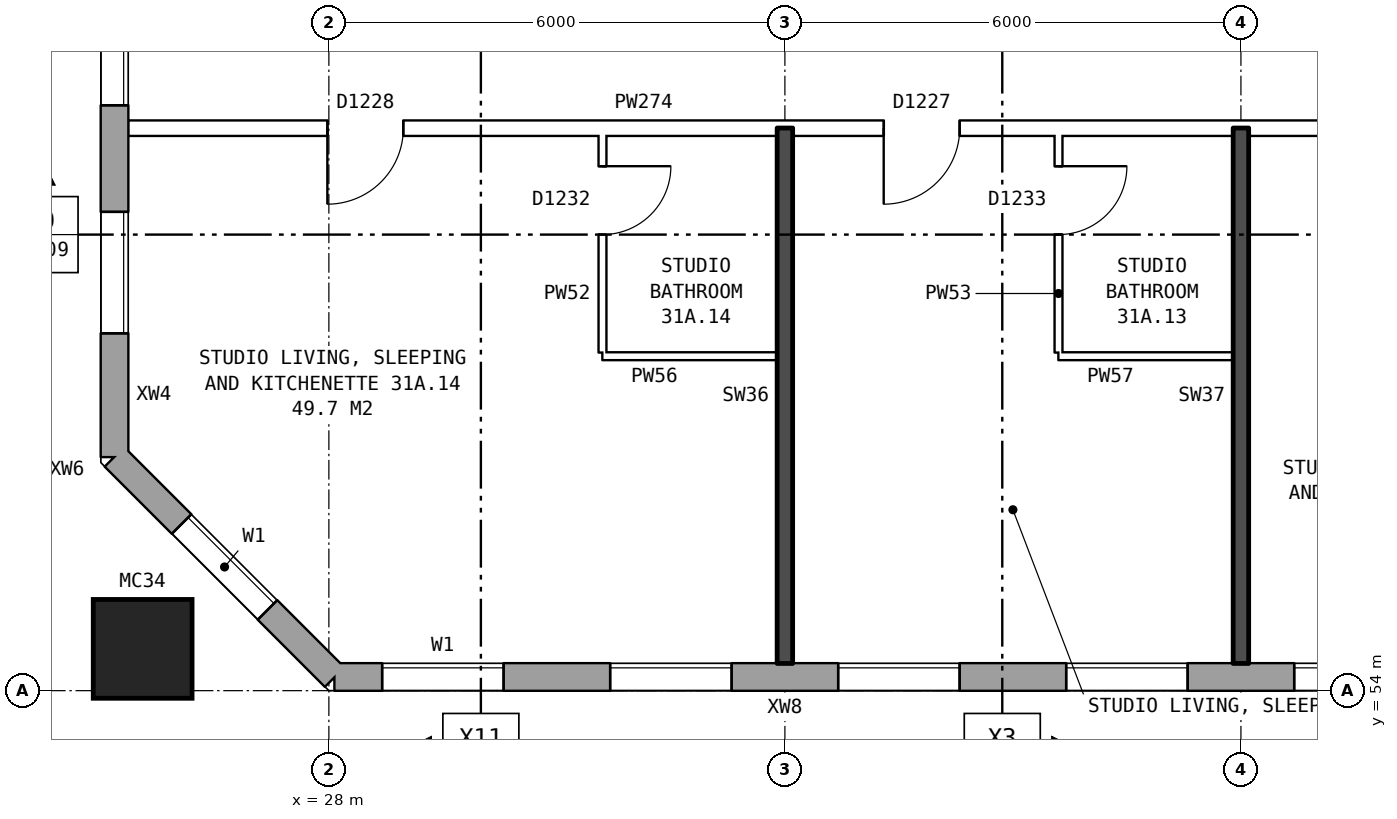
"""IFC4 building model, lengths in metres.
Left out: names, types, materials, properties, quantities, classifications, styles, units other than length and angle.
Written with IfcOpenShell. Run it as: python <this file> out.ifc"""

import sys

from ifc_helpers import new_model, si_unit, direction, frame, frame_2d, origin, origin_2d, place, context, subcontext, project, spatial, rectangle, hollow_rectangle, extrude, element, fill, save


model = new_model("IFC4")
c1 = context("Model", 3, precision=1e-05, world=origin(), true_north=direction((0.0, 1.0)))
c2 = subcontext(c1, "Body", "Model", "MODEL_VIEW")
j1 = project(units=[si_unit("LENGTHUNIT", "METRE"), si_unit("PLANEANGLEUNIT", "RADIAN")], contexts=[c1])
p1 = place(None, origin())
s1 = spatial("IfcSite", under=j1, at=p1, CompositionType="ELEMENT")
p2 = place(p1, origin())
s2 = spatial("IfcBuilding", under=s1, at=p2, CompositionType="ELEMENT")
p3 = place(p2, frame((0.0, 0.0, 111.9)))
s3 = spatial("IfcBuildingStorey", under=s2, at=p3, CompositionType="ELEMENT", Elevation=111.9)
p4 = place(p3, frame((25.55, 54.55, 0.0), z_axis=(0.0, 0.0, 1.0), x_axis=(1.0, 0.0, 0.0)))
e1 = element("IfcColumn", 1, at=p4, inside=s3, PredefinedType="COLUMN", context=c2, shape_type="SweptSolid", body=[
    extrude(hollow_rectangle(XDim=1.3, YDim=1.3, WallThickness=0.07, at=origin_2d()), origin(), (0.0, 0.0, 1.0), 3.1),
])
p5 = place(p3, frame((25.18, 57.075, 0.0), z_axis=(0.0, 0.0, 1.0), x_axis=(0.707106781187, -0.707106781187, 0.0)))
e2 = element("IfcWall", 2, at=p5, inside=s3, PredefinedType="STANDARD", context=c2, shape_type="SweptSolid", body=[
    extrude(rectangle(XDim=4.094, YDim=0.36, at=frame_2d((2.047, 0.0))), origin(), (0.0, 0.0, 1.0), 2.85),
])
p6 = place(p5, frame((1.247, 0.0, 0.8)))
e3 = element("IfcOpeningElement", 3, at=p6, cuts=e2, PredefinedType="OPENING", context=c2, shape_type="SweptSolid", body=[
    extrude(rectangle(XDim=1.6, YDim=1.8, at=frame_2d((0.8, 0.9))), frame((0.0, 0.19, 0.0), z_axis=(0.0, -1.0, 0.0), x_axis=(1.0, 0.0, 0.0)), (0.0, 0.0, 1.0), 0.38),
])
p7 = place(p3, frame((28.075, 54.18, 0.0), z_axis=(0.0, 0.0, 1.0), x_axis=(1.0, 0.0, 0.0)))
e4 = element("IfcWall", 4, at=p7, inside=s3, PredefinedType="STANDARD", context=c2, shape_type="SweptSolid", body=[
    extrude(rectangle(XDim=44.851, YDim=0.36, at=frame_2d((22.425, 0.0))), origin(), (0.0, 0.0, 1.0), 2.85),
])
p8 = place(p7, frame((0.625, 0.0, 0.8)))
e5 = element("IfcOpeningElement", 5, at=p8, cuts=e4, PredefinedType="OPENING", context=c2, shape_type="SweptSolid", body=[
    extrude(rectangle(XDim=1.6, YDim=1.8, at=frame_2d((0.8, 0.9))), frame((0.0, 0.19, 0.0), z_axis=(0.0, -1.0, 0.0), x_axis=(1.0, 0.0, 0.0)), (0.0, 0.0, 1.0), 0.38),
])
p9 = place(p7, frame((3.625, 0.0, 0.8)))
e6 = element("IfcOpeningElement", 6, at=p9, cuts=e4, PredefinedType="OPENING", context=c2, shape_type="SweptSolid", body=[
    extrude(rectangle(XDim=1.6, YDim=1.8, at=frame_2d((0.8, 0.9))), frame((0.0, 0.19, 0.0), z_axis=(0.0, -1.0, 0.0), x_axis=(1.0, 0.0, 0.0)), (0.0, 0.0, 1.0), 0.38),
])
p10 = place(p7, frame((6.625, 0.0, 0.8)))
e7 = element("IfcOpeningElement", 7, at=p10, cuts=e4, PredefinedType="OPENING", context=c2, shape_type="SweptSolid", body=[
    extrude(rectangle(XDim=1.6, YDim=1.8, at=frame_2d((0.8, 0.9))), frame((0.0, 0.19, 0.0), z_axis=(0.0, -1.0, 0.0), x_axis=(1.0, 0.0, 0.0)), (0.0, 0.0, 1.0), 0.38),
])
p11 = place(p7, frame((9.625, 0.0, 0.8)))
e8 = element("IfcOpeningElement", 8, at=p11, cuts=e4, PredefinedType="OPENING", context=c2, shape_type="SweptSolid", body=[
    extrude(rectangle(XDim=1.6, YDim=1.8, at=frame_2d((0.8, 0.9))), frame((0.0, 0.19, 0.0), z_axis=(0.0, -1.0, 0.0), x_axis=(1.0, 0.0, 0.0)), (0.0, 0.0, 1.0), 0.38),
])
p12 = place(p7, frame((12.625, 0.0, 0.8)))
e9 = element("IfcOpeningElement", 9, at=p12, cuts=e4, PredefinedType="OPENING", context=c2, shape_type="SweptSolid", body=[
    extrude(rectangle(XDim=1.6, YDim=1.8, at=frame_2d((0.8, 0.9))), frame((0.0, 0.19, 0.0), z_axis=(0.0, -1.0, 0.0), x_axis=(1.0, 0.0, 0.0)), (0.0, 0.0, 1.0), 0.38),
])
p13 = place(p7, frame((15.625, 0.0, 0.8)))
e10 = element("IfcOpeningElement", 10, at=p13, cuts=e4, PredefinedType="OPENING", context=c2, shape_type="SweptSolid", body=[
    extrude(rectangle(XDim=1.6, YDim=1.8, at=frame_2d((0.8, 0.9))), frame((0.0, 0.19, 0.0), z_axis=(0.0, -1.0, 0.0), x_axis=(1.0, 0.0, 0.0)), (0.0, 0.0, 1.0), 0.38),
])
p14 = place(p7, frame((18.125, 0.0, 0.8)))
e11 = element("IfcOpeningElement", 11, at=p14, cuts=e4, PredefinedType="OPENING", context=c2, shape_type="SweptSolid", body=[
    extrude(rectangle(XDim=1.0, YDim=1.8, at=frame_2d((0.5, 0.9))), frame((0.0, 0.19, 0.0), z_axis=(0.0, -1.0, 0.0), x_axis=(1.0, 0.0, 0.0)), (0.0, 0.0, 1.0), 0.38),
])
p15 = place(p7, frame((21.175, 0.0, 0.15)))
e12 = element("IfcOpeningElement", 12, at=p15, cuts=e4, PredefinedType="OPENING", context=c2, shape_type="SweptSolid", body=[
    extrude(rectangle(XDim=0.6, YDim=1.2, at=frame_2d((0.3, 0.6))), frame((0.0, 0.19, 0.0), z_axis=(0.0, -1.0, 0.0), x_axis=(1.0, 0.0, 0.0)), (0.0, 0.0, 1.0), 0.38),
])
p16 = place(p7, frame((24.425, 0.0, 1.7)))
e13 = element("IfcOpeningElement", 13, at=p16, cuts=e4, PredefinedType="OPENING", context=c2, shape_type="SweptSolid", body=[
    extrude(rectangle(XDim=1.0, YDim=0.9, at=frame_2d((0.5, 0.45))), frame((0.0, 0.19, 0.0), z_axis=(0.0, -1.0, 0.0), x_axis=(1.0, 0.0, 0.0)), (0.0, 0.0, 1.0), 0.38),
])
p17 = place(p7, frame((27.625, 0.0, 0.8)))
e14 = element("IfcOpeningElement", 14, at=p17, cuts=e4, PredefinedType="OPENING", context=c2, shape_type="SweptSolid", body=[
    extrude(rectangle(XDim=1.6, YDim=1.8, at=frame_2d((0.8, 0.9))), frame((0.0, 0.19, 0.0), z_axis=(0.0, -1.0, 0.0), x_axis=(1.0, 0.0, 0.0)), (0.0, 0.0, 1.0), 0.38),
])
p18 = place(p7, frame((30.625, 0.0, 0.8)))
e15 = element("IfcOpeningElement", 15, at=p18, cuts=e4, PredefinedType="OPENING", context=c2, shape_type="SweptSolid", body=[
    extrude(rectangle(XDim=1.6, YDim=1.8, at=frame_2d((0.8, 0.9))), frame((0.0, 0.19, 0.0), z_axis=(0.0, -1.0, 0.0), x_axis=(1.0, 0.0, 0.0)), (0.0, 0.0, 1.0), 0.38),
])
p19 = place(p7, frame((33.625, 0.0, 0.8)))
e16 = element("IfcOpeningElement", 16, at=p19, cuts=e4, PredefinedType="OPENING", context=c2, shape_type="SweptSolid", body=[
    extrude(rectangle(XDim=1.6, YDim=1.8, at=frame_2d((0.8, 0.9))), frame((0.0, 0.19, 0.0), z_axis=(0.0, -1.0, 0.0), x_axis=(1.0, 0.0, 0.0)), (0.0, 0.0, 1.0), 0.38),
])
p20 = place(p7, frame((36.625, 0.0, 0.8)))
e17 = element("IfcOpeningElement", 17, at=p20, cuts=e4, PredefinedType="OPENING", context=c2, shape_type="SweptSolid", body=[
    extrude(rectangle(XDim=1.6, YDim=1.8, at=frame_2d((0.8, 0.9))), frame((0.0, 0.19, 0.0), z_axis=(0.0, -1.0, 0.0), x_axis=(1.0, 0.0, 0.0)), (0.0, 0.0, 1.0), 0.38),
])
p21 = place(p7, frame((39.625, 0.0, 0.8)))
e18 = element("IfcOpeningElement", 18, at=p21, cuts=e4, PredefinedType="OPENING", context=c2, shape_type="SweptSolid", body=[
    extrude(rectangle(XDim=1.6, YDim=1.8, at=frame_2d((0.8, 0.9))), frame((0.0, 0.19, 0.0), z_axis=(0.0, -1.0, 0.0), x_axis=(1.0, 0.0, 0.0)), (0.0, 0.0, 1.0), 0.38),
])
p22 = place(p7, frame((42.625, 0.0, 0.8)))
e19 = element("IfcOpeningElement", 19, at=p22, cuts=e4, PredefinedType="OPENING", context=c2, shape_type="SweptSolid", body=[
    extrude(rectangle(XDim=1.6, YDim=1.8, at=frame_2d((0.8, 0.9))), frame((0.0, 0.19, 0.0), z_axis=(0.0, -1.0, 0.0), x_axis=(1.0, 0.0, 0.0)), (0.0, 0.0, 1.0), 0.38),
])
p23 = place(p7, frame((19.425, 0.0, 1.7)))
e20 = element("IfcOpeningElement", 20, at=p23, cuts=e4, PredefinedType="OPENING", context=c2, shape_type="SweptSolid", body=[
    extrude(rectangle(XDim=1.0, YDim=0.9, at=frame_2d((0.5, 0.45))), frame((0.0, 0.19, 0.0), z_axis=(0.0, -1.0, 0.0), x_axis=(1.0, 0.0, 0.0)), (0.0, 0.0, 1.0), 0.38),
])
p24 = place(p7, frame((22.075, 0.0, 0.15)))
e21 = element("IfcOpeningElement", 21, at=p24, cuts=e4, PredefinedType="OPENING", context=c2, shape_type="SweptSolid", body=[
    extrude(rectangle(XDim=1.6, YDim=1.2, at=frame_2d((0.8, 0.6))), frame((0.0, 0.19, 0.0), z_axis=(0.0, -1.0, 0.0), x_axis=(1.0, 0.0, 0.0)), (0.0, 0.0, 1.0), 0.38),
])
p25 = place(p7, frame((25.725, 0.0, 0.8)))
e22 = element("IfcOpeningElement", 22, at=p25, cuts=e4, PredefinedType="OPENING", context=c2, shape_type="SweptSolid", body=[
    extrude(rectangle(XDim=1.0, YDim=1.8, at=frame_2d((0.5, 0.9))), frame((0.0, 0.19, 0.0), z_axis=(0.0, -1.0, 0.0), x_axis=(1.0, 0.0, 0.0)), (0.0, 0.0, 1.0), 0.38),
])
p26 = place(p3, frame((25.18, 82.925, 0.0), z_axis=(0.0, 0.0, 1.0), x_axis=(0.0, -1.0, 0.0)))
e23 = element("IfcWall", 23, at=p26, inside=s3, PredefinedType="STANDARD", context=c2, shape_type="SweptSolid", body=[
    extrude(rectangle(XDim=25.851, YDim=0.36, at=frame_2d((12.925, 0.0))), origin(), (0.0, 0.0, 1.0), 2.85),
])
p27 = place(p26, frame((1.625, 0.0, 0.8)))
e24 = element("IfcOpeningElement", 24, at=p27, cuts=e23, PredefinedType="OPENING", context=c2, shape_type="SweptSolid", body=[
    extrude(rectangle(XDim=1.6, YDim=1.8, at=frame_2d((0.8, 0.9))), frame((0.0, 0.19, 0.0), z_axis=(0.0, -1.0, 0.0), x_axis=(1.0, 0.0, 0.0)), (0.0, 0.0, 1.0), 0.38),
])
p28 = place(p26, frame((4.625, 0.0, 0.8)))
e25 = element("IfcOpeningElement", 25, at=p28, cuts=e23, PredefinedType="OPENING", context=c2, shape_type="SweptSolid", body=[
    extrude(rectangle(XDim=1.6, YDim=1.8, at=frame_2d((0.8, 0.9))), frame((0.0, 0.19, 0.0), z_axis=(0.0, -1.0, 0.0), x_axis=(1.0, 0.0, 0.0)), (0.0, 0.0, 1.0), 0.38),
])
p29 = place(p26, frame((7.625, 0.0, 0.8)))
e26 = element("IfcOpeningElement", 26, at=p29, cuts=e23, PredefinedType="OPENING", context=c2, shape_type="SweptSolid", body=[
    extrude(rectangle(XDim=1.6, YDim=1.8, at=frame_2d((0.8, 0.9))), frame((0.0, 0.19, 0.0), z_axis=(0.0, -1.0, 0.0), x_axis=(1.0, 0.0, 0.0)), (0.0, 0.0, 1.0), 0.38),
])
p30 = place(p26, frame((10.625, 0.0, 0.8)))
e27 = element("IfcOpeningElement", 27, at=p30, cuts=e23, PredefinedType="OPENING", context=c2, shape_type="SweptSolid", body=[
    extrude(rectangle(XDim=1.6, YDim=1.8, at=frame_2d((0.8, 0.9))), frame((0.0, 0.19, 0.0), z_axis=(0.0, -1.0, 0.0), x_axis=(1.0, 0.0, 0.0)), (0.0, 0.0, 1.0), 0.38),
])
p31 = place(p26, frame((13.625, 0.0, 0.8)))
e28 = element("IfcOpeningElement", 28, at=p31, cuts=e23, PredefinedType="OPENING", context=c2, shape_type="SweptSolid", body=[
    extrude(rectangle(XDim=1.6, YDim=1.8, at=frame_2d((0.8, 0.9))), frame((0.0, 0.19, 0.0), z_axis=(0.0, -1.0, 0.0), x_axis=(1.0, 0.0, 0.0)), (0.0, 0.0, 1.0), 0.38),
])
p32 = place(p26, frame((16.625, 0.0, 0.8)))
e29 = element("IfcOpeningElement", 29, at=p32, cuts=e23, PredefinedType="OPENING", context=c2, shape_type="SweptSolid", body=[
    extrude(rectangle(XDim=1.6, YDim=1.8, at=frame_2d((0.8, 0.9))), frame((0.0, 0.19, 0.0), z_axis=(0.0, -1.0, 0.0), x_axis=(1.0, 0.0, 0.0)), (0.0, 0.0, 1.0), 0.38),
])
p33 = place(p26, frame((19.625, 0.0, 0.8)))
e30 = element("IfcOpeningElement", 30, at=p33, cuts=e23, PredefinedType="OPENING", context=c2, shape_type="SweptSolid", body=[
    extrude(rectangle(XDim=1.6, YDim=1.8, at=frame_2d((0.8, 0.9))), frame((0.0, 0.19, 0.0), z_axis=(0.0, -1.0, 0.0), x_axis=(1.0, 0.0, 0.0)), (0.0, 0.0, 1.0), 0.38),
])
p34 = place(p26, frame((22.625, 0.0, 0.8)))
e31 = element("IfcOpeningElement", 31, at=p34, cuts=e23, PredefinedType="OPENING", context=c2, shape_type="SweptSolid", body=[
    extrude(rectangle(XDim=1.6, YDim=1.8, at=frame_2d((0.8, 0.9))), frame((0.0, 0.19, 0.0), z_axis=(0.0, -1.0, 0.0), x_axis=(1.0, 0.0, 0.0)), (0.0, 0.0, 1.0), 0.38),
])
for number, where, z_axis, x_axis in (
    (32, (31.6, 58.4, 0.0), (0.0, 0.0, 1.0), (1.0, 0.0, 0.0)),
    (33, (37.6, 58.4, 0.0), (0.0, 0.0, 1.0), (1.0, 0.0, 0.0)),
):
    element("IfcWall", number, at=place(p3, frame(where, z_axis=z_axis, x_axis=x_axis)), inside=s3, PredefinedType="PARTITIONING", context=c2, shape_type="SweptSolid", body=[
        extrude(rectangle(XDim=2.3, YDim=0.1, at=frame_2d((1.15, 0.0))), origin(), (0.0, 0.0, 1.0), 2.85),
    ])
p35 = place(p3, frame((25.36, 61.4, 0.0), z_axis=(0.0, 0.0, 1.0), x_axis=(1.0, 0.0, 0.0)))
e34 = element("IfcWall", 34, at=p35, inside=s3, PredefinedType="PARTITIONING", context=c2, shape_type="SweptSolid", body=[
    extrude(rectangle(XDim=20.54, YDim=0.2, at=frame_2d((10.27, 0.0))), origin(), (0.0, 0.0, 1.0), 2.85),
])
p36 = place(p35, frame((15.94, 0.0, 0.0)))
e35 = element("IfcOpeningElement", 35, at=p36, cuts=e34, PredefinedType="OPENING", context=c2, shape_type="SweptSolid", body=[
    extrude(rectangle(XDim=1.0, YDim=2.1, at=frame_2d((0.5, 1.05))), frame((0.0, 0.11, 0.0), z_axis=(0.0, -1.0, 0.0), x_axis=(1.0, 0.0, 0.0)), (0.0, 0.0, 1.0), 0.22),
])
p37 = place(p35, frame((9.94, 0.0, 0.0)))
e36 = element("IfcOpeningElement", 36, at=p37, cuts=e34, PredefinedType="OPENING", context=c2, shape_type="SweptSolid", body=[
    extrude(rectangle(XDim=1.0, YDim=2.1, at=frame_2d((0.5, 1.05))), frame((0.0, 0.11, 0.0), z_axis=(0.0, -1.0, 0.0), x_axis=(1.0, 0.0, 0.0)), (0.0, 0.0, 1.0), 0.22),
])
p38 = place(p35, frame((2.62, 0.0, 0.0)))
e37 = element("IfcOpeningElement", 37, at=p38, cuts=e34, PredefinedType="OPENING", context=c2, shape_type="SweptSolid", body=[
    extrude(rectangle(XDim=1.0, YDim=2.1, at=frame_2d((0.5, 1.05))), frame((0.0, 0.11, 0.0), z_axis=(0.0, -1.0, 0.0), x_axis=(1.0, 0.0, 0.0)), (0.0, 0.0, 1.0), 0.22),
])
p39 = place(p3, frame((31.6, 58.45, 0.0), z_axis=(0.0, 0.0, 1.0), x_axis=(0.0, 1.0, 0.0)))
e38 = element("IfcWall", 38, at=p39, inside=s3, PredefinedType="PARTITIONING", context=c2, shape_type="SweptSolid", body=[
    extrude(rectangle(XDim=2.85, YDim=0.1, at=frame_2d((1.425, 0.0))), origin(), (0.0, 0.0, 1.0), 2.85),
])
p40 = place(p39, frame((1.55, 0.0, 0.0)))
e39 = element("IfcOpeningElement", 39, at=p40, cuts=e38, PredefinedType="OPENING", context=c2, shape_type="SweptSolid", body=[
    extrude(rectangle(XDim=0.9, YDim=2.1, at=frame_2d((0.45, 1.05))), frame((0.0, 0.06, 0.0), z_axis=(0.0, -1.0, 0.0), x_axis=(1.0, 0.0, 0.0)), (0.0, 0.0, 1.0), 0.12),
])
p41 = place(p3, frame((34.0, 54.36, 0.0), z_axis=(0.0, 0.0, 1.0), x_axis=(0.0, 1.0, 0.0)))
e40 = element("IfcWall", 40, at=p41, inside=s3, PredefinedType="SOLIDWALL", context=c2, shape_type="SweptSolid", body=[
    extrude(rectangle(XDim=7.04, YDim=0.2, at=frame_2d((3.52, 0.0))), origin(), (0.0, 0.0, 1.0), 2.85),
])
p42 = place(p3, frame((37.6, 58.45, 0.0), z_axis=(0.0, 0.0, 1.0), x_axis=(0.0, 1.0, 0.0)))
e41 = element("IfcWall", 41, at=p42, inside=s3, PredefinedType="PARTITIONING", context=c2, shape_type="SweptSolid", body=[
    extrude(rectangle(XDim=2.85, YDim=0.1, at=frame_2d((1.425, 0.0))), origin(), (0.0, 0.0, 1.0), 2.85),
])
p43 = place(p42, frame((1.55, 0.0, 0.0)))
e42 = element("IfcOpeningElement", 42, at=p43, cuts=e41, PredefinedType="OPENING", context=c2, shape_type="SweptSolid", body=[
    extrude(rectangle(XDim=0.9, YDim=2.1, at=frame_2d((0.45, 1.05))), frame((0.0, 0.06, 0.0), z_axis=(0.0, -1.0, 0.0), x_axis=(1.0, 0.0, 0.0)), (0.0, 0.0, 1.0), 0.12),
])
p44 = place(p3, frame((40.0, 54.36, 0.0), z_axis=(0.0, 0.0, 1.0), x_axis=(0.0, 1.0, 0.0)))
e43 = element("IfcWall", 43, at=p44, inside=s3, PredefinedType="SOLIDWALL", context=c2, shape_type="SweptSolid", body=[
    extrude(rectangle(XDim=7.04, YDim=0.2, at=frame_2d((3.52, 0.0))), origin(), (0.0, 0.0, 1.0), 2.85),
])
p45 = place(p6, origin())
e44 = element("IfcWindow", 44, at=p45, inside=s3, PartitioningType="SINGLE_PANEL", PredefinedType="WINDOW", context=c2, shape_type="SweptSolid", body=[
    extrude(rectangle(XDim=1.6, YDim=1.8, at=frame_2d((0.8, 0.9))), frame((0.0, 0.15, 0.0), z_axis=(0.0, -1.0, 0.0), x_axis=(1.0, 0.0, 0.0)), (0.0, 0.0, 1.0), 0.06),
])
fill(e3, e44)
p46 = place(p8, origin())
e45 = element("IfcWindow", 45, at=p46, inside=s3, PartitioningType="SINGLE_PANEL", PredefinedType="WINDOW", context=c2, shape_type="SweptSolid", body=[
    extrude(rectangle(XDim=1.6, YDim=1.8, at=frame_2d((0.8, 0.9))), frame((0.0, 0.15, 0.0), z_axis=(0.0, -1.0, 0.0), x_axis=(1.0, 0.0, 0.0)), (0.0, 0.0, 1.0), 0.06),
])
fill(e5, e45)
p47 = place(p9, origin())
e46 = element("IfcWindow", 46, at=p47, inside=s3, PartitioningType="SINGLE_PANEL", PredefinedType="WINDOW", context=c2, shape_type="SweptSolid", body=[
    extrude(rectangle(XDim=1.6, YDim=1.8, at=frame_2d((0.8, 0.9))), frame((0.0, 0.15, 0.0), z_axis=(0.0, -1.0, 0.0), x_axis=(1.0, 0.0, 0.0)), (0.0, 0.0, 1.0), 0.06),
])
fill(e6, e46)
p48 = place(p10, origin())
e47 = element("IfcWindow", 47, at=p48, inside=s3, PartitioningType="SINGLE_PANEL", PredefinedType="WINDOW", context=c2, shape_type="SweptSolid", body=[
    extrude(rectangle(XDim=1.6, YDim=1.8, at=frame_2d((0.8, 0.9))), frame((0.0, 0.15, 0.0), z_axis=(0.0, -1.0, 0.0), x_axis=(1.0, 0.0, 0.0)), (0.0, 0.0, 1.0), 0.06),
])
fill(e7, e47)
p49 = place(p11, origin())
e48 = element("IfcWindow", 48, at=p49, inside=s3, PartitioningType="SINGLE_PANEL", PredefinedType="WINDOW", context=c2, shape_type="SweptSolid", body=[
    extrude(rectangle(XDim=1.6, YDim=1.8, at=frame_2d((0.8, 0.9))), frame((0.0, 0.15, 0.0), z_axis=(0.0, -1.0, 0.0), x_axis=(1.0, 0.0, 0.0)), (0.0, 0.0, 1.0), 0.06),
])
fill(e8, e48)
p50 = place(p12, origin())
e49 = element("IfcWindow", 49, at=p50, inside=s3, PartitioningType="SINGLE_PANEL", PredefinedType="WINDOW", context=c2, shape_type="SweptSolid", body=[
    extrude(rectangle(XDim=1.6, YDim=1.8, at=frame_2d((0.8, 0.9))), frame((0.0, 0.15, 0.0), z_axis=(0.0, -1.0, 0.0), x_axis=(1.0, 0.0, 0.0)), (0.0, 0.0, 1.0), 0.06),
])
fill(e9, e49)
p51 = place(p33, origin())
e50 = element("IfcWindow", 50, at=p51, inside=s3, PartitioningType="SINGLE_PANEL", PredefinedType="WINDOW", context=c2, shape_type="SweptSolid", body=[
    extrude(rectangle(XDim=1.6, YDim=1.8, at=frame_2d((0.8, 0.9))), frame((0.0, 0.15, 0.0), z_axis=(0.0, -1.0, 0.0), x_axis=(1.0, 0.0, 0.0)), (0.0, 0.0, 1.0), 0.06),
])
fill(e30, e50)
p52 = place(p34, origin())
e51 = element("IfcWindow", 51, at=p52, inside=s3, PartitioningType="SINGLE_PANEL", PredefinedType="WINDOW", context=c2, shape_type="SweptSolid", body=[
    extrude(rectangle(XDim=1.6, YDim=1.8, at=frame_2d((0.8, 0.9))), frame((0.0, 0.15, 0.0), z_axis=(0.0, -1.0, 0.0), x_axis=(1.0, 0.0, 0.0)), (0.0, 0.0, 1.0), 0.06),
])
fill(e31, e51)
p53 = place(p37, frame((1.0, 0.0, 0.0), z_axis=(0.0, 0.0, 1.0), x_axis=(-1.0, 0.0, 0.0)))
e52 = element("IfcDoor", 52, at=p53, inside=s3, OperationType="SINGLE_SWING_RIGHT", PredefinedType="DOOR", context=c2, shape_type="SweptSolid", body=[
    extrude(rectangle(XDim=1.0, YDim=2.1, at=frame_2d((0.5, 1.05))), frame((0.0, 0.025, 0.0), z_axis=(0.0, -1.0, 0.0), x_axis=(1.0, 0.0, 0.0)), (0.0, 0.0, 1.0), 0.05),
])
fill(e36, e52)
p54 = place(p43, frame((0.9, 0.0, 0.0), z_axis=(0.0, 0.0, 1.0), x_axis=(-1.0, 0.0, 0.0)))
e53 = element("IfcDoor", 53, at=p54, inside=s3, OperationType="SINGLE_SWING_LEFT", PredefinedType="DOOR", context=c2, shape_type="SweptSolid", body=[
    extrude(rectangle(XDim=0.9, YDim=2.1, at=frame_2d((0.45, 1.05))), frame((0.0, 0.025, 0.0), z_axis=(0.0, -1.0, 0.0), x_axis=(1.0, 0.0, 0.0)), (0.0, 0.0, 1.0), 0.05),
])
fill(e42, e53)
p55 = place(p38, frame((1.0, 0.0, 0.0), z_axis=(0.0, 0.0, 1.0), x_axis=(-1.0, 0.0, 0.0)))
e54 = element("IfcDoor", 54, at=p55, inside=s3, OperationType="SINGLE_SWING_RIGHT", PredefinedType="DOOR", context=c2, shape_type="SweptSolid", body=[
    extrude(rectangle(XDim=1.0, YDim=2.1, at=frame_2d((0.5, 1.05))), frame((0.0, 0.025, 0.0), z_axis=(0.0, -1.0, 0.0), x_axis=(1.0, 0.0, 0.0)), (0.0, 0.0, 1.0), 0.05),
])
fill(e37, e54)
p56 = place(p40, frame((0.9, 0.0, 0.0), z_axis=(0.0, 0.0, 1.0), x_axis=(-1.0, 0.0, 0.0)))
e55 = element("IfcDoor", 55, at=p56, inside=s3, OperationType="SINGLE_SWING_LEFT", PredefinedType="DOOR", context=c2, shape_type="SweptSolid", body=[
    extrude(rectangle(XDim=0.9, YDim=2.1, at=frame_2d((0.45, 1.05))), frame((0.0, 0.025, 0.0), z_axis=(0.0, -1.0, 0.0), x_axis=(1.0, 0.0, 0.0)), (0.0, 0.0, 1.0), 0.05),
])
fill(e39, e55)
save(model, sys.argv[1])
